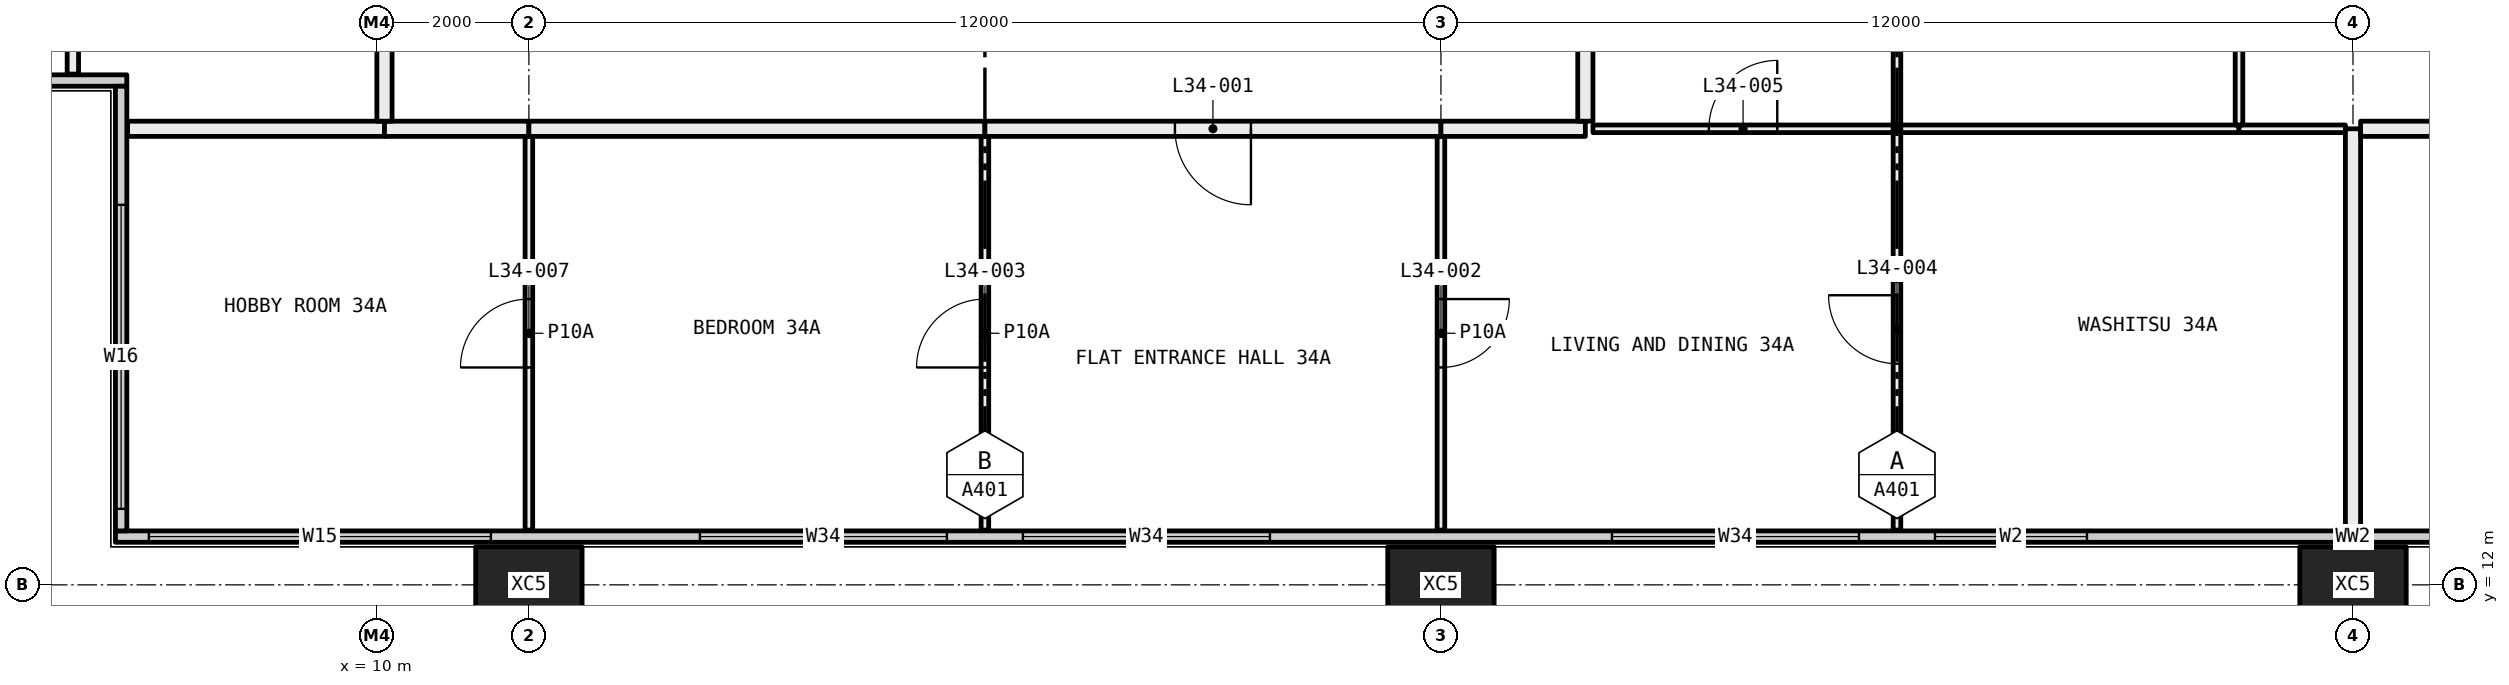
"""IFC4 building model, lengths in metres.
Left out: names, types, materials, properties, quantities, classifications, styles, units other than length and angle.
Written with IfcOpenShell. Run it as: python <this file> out.ifc"""

import sys

from ifc_helpers import new_model, si_unit, direction, frame, frame_2d, origin, origin_2d, place, context, subcontext, project, spatial, rectangle, hollow_rectangle, extrude, element, fill, save


model = new_model("IFC4")
c1 = context("Model", 3, precision=1e-05, world=origin(), true_north=direction((0.0, 1.0)))
c2 = subcontext(c1, "Body", "Model", "MODEL_VIEW")
j1 = project(units=[si_unit("LENGTHUNIT", "METRE"), si_unit("PLANEANGLEUNIT", "RADIAN")], contexts=[c1])
p1 = place(None, origin())
s1 = spatial("IfcSite", under=j1, at=p1, CompositionType="ELEMENT")
p2 = place(p1, origin())
s2 = spatial("IfcBuilding", under=s1, at=p2, CompositionType="ELEMENT")
p3 = place(p2, frame((0.0, 0.0, 131.1)))
s3 = spatial("IfcBuildingStorey", under=s2, at=p3, CompositionType="ELEMENT", Elevation=131.1)
for number, where, z_axis, x_axis in (
    (1, (12.0, 12.0, -0.4), (0.0, 0.0, 1.0), (1.0, 0.0, 0.0)),
    (2, (24.0, 12.0, -0.4), (0.0, 0.0, 1.0), (1.0, 0.0, 0.0)),
    (3, (36.0, 12.0, -0.4), (0.0, 0.0, 1.0), (1.0, 0.0, 0.0)),
):
    element("IfcColumn", number, at=place(p3, frame(where, z_axis=z_axis, x_axis=x_axis)), inside=s3, PredefinedType="COLUMN", context=c2, shape_type="SweptSolid", body=[
        extrude(hollow_rectangle(XDim=1.4, YDim=1.0, WallThickness=0.055, at=origin_2d()), origin(), (0.0, 0.0, 1.0), 3.45),
    ])
p4 = place(p3, frame((6.56, 12.635, 0.0), z_axis=(0.0, 0.0, 1.0), x_axis=(1.0, 0.0, 0.0)))
e4 = element("IfcWall", 4, at=p4, inside=s3, PredefinedType="ELEMENTEDWALL", context=c2, shape_type="SweptSolid", body=[
    extrude(rectangle(XDim=58.88, YDim=0.15, at=frame_2d((29.44, 0.0))), origin(), (0.0, 0.0, 1.0), 3.05),
])
p5 = place(p4, frame((0.44, 0.0, 0.45)))
e5 = element("IfcOpeningElement", 5, at=p5, cuts=e4, PredefinedType="OPENING", context=c2, shape_type="SweptSolid", body=[
    extrude(rectangle(XDim=4.5, YDim=2.55, at=frame_2d((2.25, 1.275))), frame((0.0, 0.085, 0.0), z_axis=(0.0, -1.0, 0.0), x_axis=(1.0, 0.0, 0.0)), (0.0, 0.0, 1.0), 0.17),
])
p6 = place(p4, frame((7.69, 0.0, 0.45)))
e6 = element("IfcOpeningElement", 6, at=p6, cuts=e4, PredefinedType="OPENING", context=c2, shape_type="SweptSolid", body=[
    extrude(rectangle(XDim=3.25, YDim=2.55, at=frame_2d((1.625, 1.275))), frame((0.0, 0.085, 0.0), z_axis=(0.0, -1.0, 0.0), x_axis=(1.0, 0.0, 0.0)), (0.0, 0.0, 1.0), 0.17),
])
p7 = place(p4, frame((11.94, 0.0, 0.45)))
e7 = element("IfcOpeningElement", 7, at=p7, cuts=e4, PredefinedType="OPENING", context=c2, shape_type="SweptSolid", body=[
    extrude(rectangle(XDim=3.25, YDim=2.55, at=frame_2d((1.625, 1.275))), frame((0.0, 0.085, 0.0), z_axis=(0.0, -1.0, 0.0), x_axis=(1.0, 0.0, 0.0)), (0.0, 0.0, 1.0), 0.17),
])
p8 = place(p4, frame((19.69, 0.0, 0.45)))
e8 = element("IfcOpeningElement", 8, at=p8, cuts=e4, PredefinedType="OPENING", context=c2, shape_type="SweptSolid", body=[
    extrude(rectangle(XDim=3.25, YDim=2.55, at=frame_2d((1.625, 1.275))), frame((0.0, 0.085, 0.0), z_axis=(0.0, -1.0, 0.0), x_axis=(1.0, 0.0, 0.0)), (0.0, 0.0, 1.0), 0.17),
])
p9 = place(p4, frame((23.94, 0.0, 0.45)))
e9 = element("IfcOpeningElement", 9, at=p9, cuts=e4, PredefinedType="OPENING", context=c2, shape_type="SweptSolid", body=[
    extrude(rectangle(XDim=2.0, YDim=2.55, at=frame_2d((1.0, 1.275))), frame((0.0, 0.085, 0.0), z_axis=(0.0, -1.0, 0.0), x_axis=(1.0, 0.0, 0.0)), (0.0, 0.0, 1.0), 0.17),
])
p10 = place(p4, frame((31.69, 0.0, 0.45)))
e10 = element("IfcOpeningElement", 10, at=p10, cuts=e4, PredefinedType="OPENING", context=c2, shape_type="SweptSolid", body=[
    extrude(rectangle(XDim=3.25, YDim=2.55, at=frame_2d((1.625, 1.275))), frame((0.0, 0.085, 0.0), z_axis=(0.0, -1.0, 0.0), x_axis=(1.0, 0.0, 0.0)), (0.0, 0.0, 1.0), 0.17),
])
p11 = place(p4, frame((35.94, 0.0, 0.45)))
e11 = element("IfcOpeningElement", 11, at=p11, cuts=e4, PredefinedType="OPENING", context=c2, shape_type="SweptSolid", body=[
    extrude(rectangle(XDim=3.25, YDim=2.55, at=frame_2d((1.625, 1.275))), frame((0.0, 0.085, 0.0), z_axis=(0.0, -1.0, 0.0), x_axis=(1.0, 0.0, 0.0)), (0.0, 0.0, 1.0), 0.17),
])
p12 = place(p4, frame((43.69, 0.0, 0.45)))
e12 = element("IfcOpeningElement", 12, at=p12, cuts=e4, PredefinedType="OPENING", context=c2, shape_type="SweptSolid", body=[
    extrude(rectangle(XDim=3.25, YDim=2.55, at=frame_2d((1.625, 1.275))), frame((0.0, 0.085, 0.0), z_axis=(0.0, -1.0, 0.0), x_axis=(1.0, 0.0, 0.0)), (0.0, 0.0, 1.0), 0.17),
])
p13 = place(p4, frame((47.94, 0.0, 0.45)))
e13 = element("IfcOpeningElement", 13, at=p13, cuts=e4, PredefinedType="OPENING", context=c2, shape_type="SweptSolid", body=[
    extrude(rectangle(XDim=2.0, YDim=2.55, at=frame_2d((1.0, 1.275))), frame((0.0, 0.085, 0.0), z_axis=(0.0, -1.0, 0.0), x_axis=(1.0, 0.0, 0.0)), (0.0, 0.0, 1.0), 0.17),
])
p14 = place(p4, frame((53.94, 0.0, 0.45)))
e14 = element("IfcOpeningElement", 14, at=p14, cuts=e4, PredefinedType="OPENING", context=c2, shape_type="SweptSolid", body=[
    extrude(rectangle(XDim=4.5, YDim=2.55, at=frame_2d((2.25, 1.275))), frame((0.0, 0.085, 0.0), z_axis=(0.0, -1.0, 0.0), x_axis=(1.0, 0.0, 0.0)), (0.0, 0.0, 1.0), 0.17),
])
p15 = place(p3, frame((0.56, 18.635, 0.0), z_axis=(0.0, 0.0, 1.0), x_axis=(1.0, 0.0, 0.0)))
e15 = element("IfcWall", 15, at=p15, inside=s3, PredefinedType="ELEMENTEDWALL", context=c2, shape_type="SweptSolid", body=[
    extrude(rectangle(XDim=6.15, YDim=0.15, at=frame_2d((3.075, 0.0))), origin(), (0.0, 0.0, 1.0), 3.05),
])
p16 = place(p15, frame((0.44, 0.0, 0.45)))
e16 = element("IfcOpeningElement", 16, at=p16, cuts=e15, PredefinedType="OPENING", context=c2, shape_type="SweptSolid", body=[
    extrude(rectangle(XDim=4.0, YDim=2.55, at=frame_2d((2.0, 1.275))), frame((0.0, 0.085, 0.0), z_axis=(0.0, -1.0, 0.0), x_axis=(1.0, 0.0, 0.0)), (0.0, 0.0, 1.0), 0.17),
])
p17 = place(p3, frame((6.635, 12.71, 0.0), z_axis=(0.0, 0.0, 1.0), x_axis=(0.0, 1.0, 0.0)))
e17 = element("IfcWall", 17, at=p17, inside=s3, PredefinedType="ELEMENTEDWALL", context=c2, shape_type="SweptSolid", body=[
    extrude(rectangle(XDim=5.85, YDim=0.15, at=frame_2d((2.925, 0.0))), origin(), (0.0, 0.0, 1.0), 3.05),
])
p18 = place(p17, frame((0.29, 0.0, 0.45)))
e18 = element("IfcOpeningElement", 18, at=p18, cuts=e17, PredefinedType="OPENING", context=c2, shape_type="SweptSolid", body=[
    extrude(rectangle(XDim=4.0, YDim=2.55, at=frame_2d((2.0, 1.275))), frame((0.0, 0.085, 0.0), z_axis=(0.0, -1.0, 0.0), x_axis=(1.0, 0.0, 0.0)), (0.0, 0.0, 1.0), 0.17),
])
p19 = place(p3, frame((12.0, 12.72, 0.0), z_axis=(0.0, 0.0, 1.0), x_axis=(0.0, 1.0, 0.0)))
e19 = element("IfcWall", 19, at=p19, inside=s3, PredefinedType="PARTITIONING", context=c2, shape_type="SweptSolid", body=[
    extrude(rectangle(XDim=5.18, YDim=0.1, at=frame_2d((2.59, 0.0))), origin(), (0.0, 0.0, 1.0), 3.05),
])
p20 = place(p19, frame((2.14, 0.0, 0.0)))
e20 = element("IfcOpeningElement", 20, at=p20, cuts=e19, PredefinedType="OPENING", context=c2, shape_type="SweptSolid", body=[
    extrude(rectangle(XDim=0.9, YDim=2.1, at=frame_2d((0.45, 1.05))), frame((0.0, 0.06, 0.0), z_axis=(0.0, -1.0, 0.0), x_axis=(1.0, 0.0, 0.0)), (0.0, 0.0, 1.0), 0.12),
])
p21 = place(p3, frame((10.1, 18.0, 0.0), z_axis=(0.0, 0.0, 1.0), x_axis=(-1.0, 0.0, 0.0)))
e21 = element("IfcWall", 21, at=p21, inside=s3, PredefinedType="PARTITIONING", context=c2, shape_type="SweptSolid", body=[
    extrude(rectangle(XDim=3.38, YDim=0.2, at=frame_2d((1.69, 0.0))), origin(), (0.0, 0.0, 1.0), 3.05),
])
p22 = place(p3, frame((12.0, 18.0, 0.0), z_axis=(0.0, 0.0, 1.0), x_axis=(-1.0, 0.0, 0.0)))
e22 = element("IfcWall", 22, at=p22, inside=s3, PredefinedType="PARTITIONING", context=c2, shape_type="SweptSolid", body=[
    extrude(rectangle(XDim=1.9, YDim=0.2, at=frame_2d((0.95, 0.0))), origin(), (0.0, 0.0, 1.0), 3.05),
])
p23 = place(p3, frame((18.0, 12.72, 0.0), z_axis=(0.0, 0.0, 1.0), x_axis=(0.0, 1.0, 0.0)))
e23 = element("IfcWall", 23, at=p23, inside=s3, PredefinedType="PARTITIONING", context=c2, shape_type="SweptSolid", body=[
    extrude(rectangle(XDim=5.18, YDim=0.1, at=frame_2d((2.59, 0.0))), origin(), (0.0, 0.0, 1.0), 3.05),
])
p24 = place(p23, frame((2.14, 0.0, 0.0)))
e24 = element("IfcOpeningElement", 24, at=p24, cuts=e23, PredefinedType="OPENING", context=c2, shape_type="SweptSolid", body=[
    extrude(rectangle(XDim=0.9, YDim=2.1, at=frame_2d((0.45, 1.05))), frame((0.0, 0.06, 0.0), z_axis=(0.0, -1.0, 0.0), x_axis=(1.0, 0.0, 0.0)), (0.0, 0.0, 1.0), 0.12),
])
p25 = place(p3, frame((18.0, 18.0, 0.0), z_axis=(0.0, 0.0, 1.0), x_axis=(-1.0, 0.0, 0.0)))
e25 = element("IfcWall", 25, at=p25, inside=s3, PredefinedType="PARTITIONING", context=c2, shape_type="SweptSolid", body=[
    extrude(rectangle(XDim=6.0, YDim=0.2, at=frame_2d((3.0, 0.0))), origin(), (0.0, 0.0, 1.0), 3.05),
])
p26 = place(p3, frame((24.0, 12.72, 0.0), z_axis=(0.0, 0.0, 1.0), x_axis=(0.0, 1.0, 0.0)))
e26 = element("IfcWall", 26, at=p26, inside=s3, PredefinedType="PARTITIONING", context=c2, shape_type="SweptSolid", body=[
    extrude(rectangle(XDim=5.18, YDim=0.1, at=frame_2d((2.59, 0.0))), origin(), (0.0, 0.0, 1.0), 3.05),
])
p27 = place(p26, frame((2.14, 0.0, 0.0)))
e27 = element("IfcOpeningElement", 27, at=p27, cuts=e26, PredefinedType="OPENING", context=c2, shape_type="SweptSolid", body=[
    extrude(rectangle(XDim=0.9, YDim=2.1, at=frame_2d((0.45, 1.05))), frame((0.0, 0.06, 0.0), z_axis=(0.0, -1.0, 0.0), x_axis=(1.0, 0.0, 0.0)), (0.0, 0.0, 1.0), 0.12),
])
p28 = place(p3, frame((24.0, 18.0, 0.0), z_axis=(0.0, 0.0, 1.0), x_axis=(-1.0, 0.0, 0.0)))
e28 = element("IfcWall", 28, at=p28, inside=s3, PredefinedType="PARTITIONING", context=c2, shape_type="SweptSolid", body=[
    extrude(rectangle(XDim=6.0, YDim=0.2, at=frame_2d((3.0, 0.0))), origin(), (0.0, 0.0, 1.0), 3.05),
])
p29 = place(p28, frame((2.5, 0.0, 0.0)))
e29 = element("IfcOpeningElement", 29, at=p29, cuts=e28, PredefinedType="OPENING", context=c2, shape_type="SweptSolid", body=[
    extrude(rectangle(XDim=1.0, YDim=2.1, at=frame_2d((0.5, 1.05))), frame((0.0, 0.11, 0.0), z_axis=(0.0, -1.0, 0.0), x_axis=(1.0, 0.0, 0.0)), (0.0, 0.0, 1.0), 0.22),
])
p30 = place(p3, frame((30.0, 12.72, 0.0), z_axis=(0.0, 0.0, 1.0), x_axis=(0.0, 1.0, 0.0)))
e30 = element("IfcWall", 30, at=p30, inside=s3, PredefinedType="PARTITIONING", context=c2, shape_type="SweptSolid", body=[
    extrude(rectangle(XDim=5.28, YDim=0.1, at=frame_2d((2.64, 0.0))), origin(), (0.0, 0.0, 1.0), 3.05),
])
p31 = place(p30, frame((2.19, 0.0, 0.0)))
e31 = element("IfcOpeningElement", 31, at=p31, cuts=e30, PredefinedType="OPENING", context=c2, shape_type="SweptSolid", body=[
    extrude(rectangle(XDim=0.9, YDim=2.1, at=frame_2d((0.45, 1.05))), frame((0.0, 0.06, 0.0), z_axis=(0.0, -1.0, 0.0), x_axis=(1.0, 0.0, 0.0)), (0.0, 0.0, 1.0), 0.12),
])
p32 = place(p3, frame((29.95, 18.0, 0.0), z_axis=(0.0, 0.0, 1.0), x_axis=(-1.0, 0.0, 0.0)))
e32 = element("IfcWall", 32, at=p32, inside=s3, PredefinedType="PARTITIONING", context=c2, shape_type="SweptSolid", body=[
    extrude(rectangle(XDim=3.95, YDim=0.1, at=frame_2d((1.975, 0.0))), origin(), (0.0, 0.0, 1.0), 3.05),
])
p33 = place(p32, frame((1.525, 0.0, 0.0)))
e33 = element("IfcOpeningElement", 33, at=p33, cuts=e32, PredefinedType="OPENING", context=c2, shape_type="SweptSolid", body=[
    extrude(rectangle(XDim=0.9, YDim=2.1, at=frame_2d((0.45, 1.05))), frame((0.0, 0.06, 0.0), z_axis=(0.0, -1.0, 0.0), x_axis=(1.0, 0.0, 0.0)), (0.0, 0.0, 1.0), 0.12),
])
p34 = place(p3, frame((25.9, 18.0, 0.0), z_axis=(0.0, 0.0, 1.0), x_axis=(-1.0, 0.0, 0.0)))
e34 = element("IfcWall", 34, at=p34, inside=s3, PredefinedType="PARTITIONING", context=c2, shape_type="SweptSolid", body=[
    extrude(rectangle(XDim=1.9, YDim=0.2, at=frame_2d((0.95, 0.0))), origin(), (0.0, 0.0, 1.0), 3.05),
])
p35 = place(p3, frame((34.5, 18.0, 0.0), z_axis=(0.0, 0.0, 1.0), x_axis=(-1.0, 0.0, 0.0)))
e35 = element("IfcWall", 35, at=p35, inside=s3, PredefinedType="PARTITIONING", context=c2, shape_type="SweptSolid", body=[
    extrude(rectangle(XDim=4.45, YDim=0.1, at=frame_2d((2.225, 0.0))), origin(), (0.0, 0.0, 1.0), 3.05),
])
p36 = place(p3, frame((35.9, 18.0, 0.0), z_axis=(0.0, 0.0, 1.0), x_axis=(-1.0, 0.0, 0.0)))
e36 = element("IfcWall", 36, at=p36, inside=s3, PredefinedType="PARTITIONING", context=c2, shape_type="SweptSolid", body=[
    extrude(rectangle(XDim=1.4, YDim=0.1, at=frame_2d((0.7, 0.0))), origin(), (0.0, 0.0, 1.0), 3.05),
])
p37 = place(p3, frame((36.0, 12.72, 0.0), z_axis=(0.0, 0.0, 1.0), x_axis=(0.0, 1.0, 0.0)))
e37 = element("IfcWall", 37, at=p37, inside=s3, PredefinedType="PARTITIONING", context=c2, shape_type="SweptSolid", body=[
    extrude(rectangle(XDim=5.28, YDim=0.2, at=frame_2d((2.64, 0.0))), origin(), (0.0, 0.0, 1.0), 2.45),
])
p38 = place(p3, frame((30.0, 18.05, 0.0), z_axis=(0.0, 0.0, 1.0), x_axis=(0.0, 1.0, 0.0)))
e38 = element("IfcWall", 38, at=p38, inside=s3, PredefinedType="PARTITIONING", context=c2, shape_type="SweptSolid", body=[
    extrude(rectangle(XDim=6.175, YDim=0.1, at=frame_2d((3.087, 0.0))), origin(), (0.0, 0.0, 1.0), 2.45),
])
p39 = place(p38, frame((2.637, 0.0, 0.0)))
e39 = element("IfcOpeningElement", 39, at=p39, cuts=e38, PredefinedType="OPENING", context=c2, shape_type="SweptSolid", body=[
    extrude(rectangle(XDim=0.9, YDim=2.1, at=frame_2d((0.45, 1.05))), frame((0.0, 0.06, 0.0), z_axis=(0.0, -1.0, 0.0), x_axis=(1.0, 0.0, 0.0)), (0.0, 0.0, 1.0), 0.12),
])
p40 = place(p3, frame((25.9, 23.9, 0.0), z_axis=(0.0, 0.0, 1.0), x_axis=(0.0, -1.0, 0.0)))
e40 = element("IfcWall", 40, at=p40, inside=s3, PredefinedType="PARTITIONING", context=c2, shape_type="SweptSolid", body=[
    extrude(rectangle(XDim=5.8, YDim=0.2, at=frame_2d((2.9, 0.0))), origin(), (0.0, 0.0, 1.0), 3.05),
])
p41 = place(p3, frame((34.5, 18.05, 0.0), z_axis=(0.0, 0.0, 1.0), x_axis=(0.0, 1.0, 0.0)))
e41 = element("IfcWall", 41, at=p41, inside=s3, PredefinedType="PARTITIONING", context=c2, shape_type="SweptSolid", body=[
    extrude(rectangle(XDim=6.25, YDim=0.1, at=frame_2d((3.125, 0.0))), origin(), (0.0, 0.0, 1.0), 2.45),
])
p42 = place(p41, frame((2.675, 0.0, 0.0)))
e42 = element("IfcOpeningElement", 42, at=p42, cuts=e41, PredefinedType="OPENING", context=c2, shape_type="SweptSolid", body=[
    extrude(rectangle(XDim=0.9, YDim=2.1, at=frame_2d((0.45, 1.05))), frame((0.0, 0.06, 0.0), z_axis=(0.0, -1.0, 0.0), x_axis=(1.0, 0.0, 0.0)), (0.0, 0.0, 1.0), 0.12),
])
p43 = place(p3, frame((36.1, 18.0, 0.0), z_axis=(0.0, 0.0, 1.0), x_axis=(1.0, 0.0, 0.0)))
e43 = element("IfcWall", 43, at=p43, inside=s3, PredefinedType="PARTITIONING", context=c2, shape_type="SweptSolid", body=[
    extrude(rectangle(XDim=2.3, YDim=0.2, at=frame_2d((1.15, 0.0))), origin(), (0.0, 0.0, 1.0), 3.05),
])
p44 = place(p3, frame((6.0, 18.72, 0.0), z_axis=(0.0, 0.0, 1.0), x_axis=(0.0, 1.0, 0.0)))
e44 = element("IfcWall", 44, at=p44, inside=s3, PredefinedType="PARTITIONING", context=c2, shape_type="SweptSolid", body=[
    extrude(rectangle(XDim=3.78, YDim=0.15, at=frame_2d((1.89, 0.0))), origin(), (0.0, 0.0, 1.0), 3.05),
])
p45 = place(p3, frame((10.1, 18.1, 0.0), z_axis=(0.0, 0.0, 1.0), x_axis=(0.0, 1.0, 0.0)))
e45 = element("IfcWall", 45, at=p45, inside=s3, PredefinedType="PARTITIONING", context=c2, shape_type="SweptSolid", body=[
    extrude(rectangle(XDim=4.4, YDim=0.2, at=frame_2d((2.2, 0.0))), origin(), (0.0, 0.0, 1.0), 3.05),
])
p46 = place(p5, origin())
e46 = element("IfcWindow", 46, at=p46, inside=s3, PartitioningType="SINGLE_PANEL", PredefinedType="WINDOW", context=c2, shape_type="SweptSolid", body=[
    extrude(rectangle(XDim=4.5, YDim=2.55, at=frame_2d((2.25, 1.275))), frame((0.0, 0.03, 0.0), z_axis=(0.0, -1.0, 0.0), x_axis=(1.0, 0.0, 0.0)), (0.0, 0.0, 1.0), 0.06),
])
fill(e5, e46)
p47 = place(p6, origin())
e47 = element("IfcWindow", 47, at=p47, inside=s3, PartitioningType="SINGLE_PANEL", PredefinedType="WINDOW", context=c2, shape_type="SweptSolid", body=[
    extrude(rectangle(XDim=3.25, YDim=2.55, at=frame_2d((1.625, 1.275))), frame((0.0, 0.03, 0.0), z_axis=(0.0, -1.0, 0.0), x_axis=(1.0, 0.0, 0.0)), (0.0, 0.0, 1.0), 0.06),
])
fill(e6, e47)
p48 = place(p7, origin())
e48 = element("IfcWindow", 48, at=p48, inside=s3, PartitioningType="SINGLE_PANEL", PredefinedType="WINDOW", context=c2, shape_type="SweptSolid", body=[
    extrude(rectangle(XDim=3.25, YDim=2.55, at=frame_2d((1.625, 1.275))), frame((0.0, 0.03, 0.0), z_axis=(0.0, -1.0, 0.0), x_axis=(1.0, 0.0, 0.0)), (0.0, 0.0, 1.0), 0.06),
])
fill(e7, e48)
p49 = place(p8, origin())
e49 = element("IfcWindow", 49, at=p49, inside=s3, PartitioningType="SINGLE_PANEL", PredefinedType="WINDOW", context=c2, shape_type="SweptSolid", body=[
    extrude(rectangle(XDim=3.25, YDim=2.55, at=frame_2d((1.625, 1.275))), frame((0.0, 0.03, 0.0), z_axis=(0.0, -1.0, 0.0), x_axis=(1.0, 0.0, 0.0)), (0.0, 0.0, 1.0), 0.06),
])
fill(e8, e49)
p50 = place(p9, origin())
e50 = element("IfcWindow", 50, at=p50, inside=s3, PartitioningType="SINGLE_PANEL", PredefinedType="WINDOW", context=c2, shape_type="SweptSolid", body=[
    extrude(rectangle(XDim=2.0, YDim=2.55, at=frame_2d((1.0, 1.275))), frame((0.0, 0.03, 0.0), z_axis=(0.0, -1.0, 0.0), x_axis=(1.0, 0.0, 0.0)), (0.0, 0.0, 1.0), 0.06),
])
fill(e9, e50)
p51 = place(p18, origin())
e51 = element("IfcWindow", 51, at=p51, inside=s3, PartitioningType="SINGLE_PANEL", PredefinedType="WINDOW", context=c2, shape_type="SweptSolid", body=[
    extrude(rectangle(XDim=4.0, YDim=2.55, at=frame_2d((2.0, 1.275))), frame((0.0, 0.03, 0.0), z_axis=(0.0, -1.0, 0.0), x_axis=(1.0, 0.0, 0.0)), (0.0, 0.0, 1.0), 0.06),
])
fill(e18, e51)
p52 = place(p29, origin())
e52 = element("IfcDoor", 52, at=p52, inside=s3, OperationType="SINGLE_SWING_RIGHT", PredefinedType="DOOR", context=c2, shape_type="SweptSolid", body=[
    extrude(rectangle(XDim=1.0, YDim=2.1, at=frame_2d((0.5, 1.05))), frame((0.0, 0.025, 0.0), z_axis=(0.0, -1.0, 0.0), x_axis=(1.0, 0.0, 0.0)), (0.0, 0.0, 1.0), 0.05),
])
fill(e29, e52)
p53 = place(p27, frame((0.9, 0.0, 0.0), x_axis=(-1.0, 0.0, 0.0)))
e53 = element("IfcDoor", 53, at=p53, inside=s3, OperationType="SINGLE_SWING_RIGHT", PredefinedType="DOOR", context=c2, shape_type="SweptSolid", body=[
    extrude(rectangle(XDim=0.9, YDim=2.1, at=frame_2d((0.45, 1.05))), frame((0.0, 0.025, 0.0), z_axis=(0.0, -1.0, 0.0), x_axis=(1.0, 0.0, 0.0)), (0.0, 0.0, 1.0), 0.05),
])
fill(e27, e53)
p54 = place(p24, origin())
e54 = element("IfcDoor", 54, at=p54, inside=s3, OperationType="SINGLE_SWING_RIGHT", PredefinedType="DOOR", context=c2, shape_type="SweptSolid", body=[
    extrude(rectangle(XDim=0.9, YDim=2.1, at=frame_2d((0.45, 1.05))), frame((0.0, 0.025, 0.0), z_axis=(0.0, -1.0, 0.0), x_axis=(1.0, 0.0, 0.0)), (0.0, 0.0, 1.0), 0.05),
])
fill(e24, e54)
p55 = place(p31, origin())
e55 = element("IfcDoor", 55, at=p55, inside=s3, OperationType="SINGLE_SWING_LEFT", PredefinedType="DOOR", context=c2, shape_type="SweptSolid", body=[
    extrude(rectangle(XDim=0.9, YDim=2.1, at=frame_2d((0.45, 1.05))), frame((0.0, 0.025, 0.0), z_axis=(0.0, -1.0, 0.0), x_axis=(1.0, 0.0, 0.0)), (0.0, 0.0, 1.0), 0.05),
])
fill(e31, e55)
p56 = place(p33, frame((0.9, 0.0, 0.0), x_axis=(-1.0, 0.0, 0.0)))
e56 = element("IfcDoor", 56, at=p56, inside=s3, OperationType="SINGLE_SWING_LEFT", PredefinedType="DOOR", context=c2, shape_type="SweptSolid", body=[
    extrude(rectangle(XDim=0.9, YDim=2.1, at=frame_2d((0.45, 1.05))), frame((0.0, 0.025, 0.0), z_axis=(0.0, -1.0, 0.0), x_axis=(1.0, 0.0, 0.0)), (0.0, 0.0, 1.0), 0.05),
])
fill(e33, e56)
p57 = place(p20, origin())
e57 = element("IfcDoor", 57, at=p57, inside=s3, OperationType="SINGLE_SWING_RIGHT", PredefinedType="DOOR", context=c2, shape_type="SweptSolid", body=[
    extrude(rectangle(XDim=0.9, YDim=2.1, at=frame_2d((0.45, 1.05))), frame((0.0, 0.025, 0.0), z_axis=(0.0, -1.0, 0.0), x_axis=(1.0, 0.0, 0.0)), (0.0, 0.0, 1.0), 0.05),
])
fill(e20, e57)
save(model, sys.argv[1])
